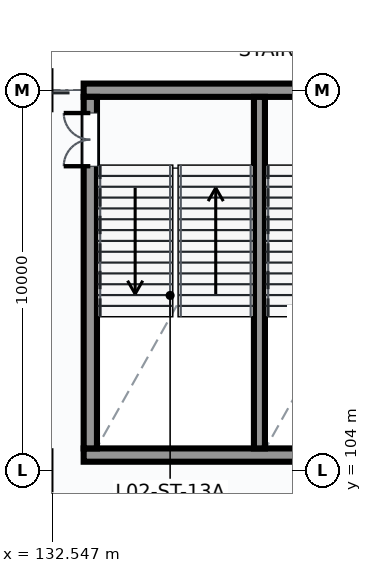
"""IFC4 building model, lengths in metres.
Left out: names, types, materials, properties, quantities, classifications, styles, units other than length and angle.
Written with IfcOpenShell. Run it as: python <this file> out.ifc"""

import sys

from ifc_helpers import new_model, si_unit, direction, frame, frame_2d, origin, place, context, subcontext, project, spatial, rectangle, extrude, element, fill, save


model = new_model("IFC4")
c1 = context("Model", 3, precision=1e-05, world=origin(), true_north=direction((0.0, 1.0)))
c2 = subcontext(c1, "Body", "Model", "MODEL_VIEW")
j1 = project(units=[si_unit("LENGTHUNIT", "METRE"), si_unit("PLANEANGLEUNIT", "RADIAN")], contexts=[c1])
p1 = place(None, origin())
s1 = spatial("IfcSite", under=j1, at=p1, CompositionType="ELEMENT")
p2 = place(p1, origin())
s2 = spatial("IfcBuilding", under=s1, at=p2, CompositionType="ELEMENT")
p3 = place(p2, frame((0.0, 0.0, 10.2)))
s3 = spatial("IfcBuildingStorey", under=s2, at=p3, CompositionType="ELEMENT", Elevation=10.2)
p4 = place(p3, frame((133.375, 104.4, 0.0), z_axis=(0.0, 0.0, 1.0), x_axis=(1.0, 0.0, 0.0)))
e1 = element("IfcWall", 1, at=p4, inside=s3, PredefinedType="SHEAR", context=c2, shape_type="SweptSolid", body=[
    extrude(rectangle(XDim=9.25, YDim=0.35, at=frame_2d((4.625, 0.0))), origin(), (0.0, 0.0, 1.0), 4.5),
])
p5 = place(p3, frame((133.375, 114.0, 0.0), z_axis=(0.0, 0.0, 1.0), x_axis=(1.0, 0.0, 0.0)))
e2 = element("IfcWall", 2, at=p5, inside=s3, PredefinedType="SHEAR", context=c2, shape_type="SweptSolid", body=[
    extrude(rectangle(XDim=9.25, YDim=0.35, at=frame_2d((4.625, 0.0))), origin(), (0.0, 0.0, 1.0), 3.586),
])
p6 = place(p3, frame((133.55, 104.575, 0.0), z_axis=(0.0, 0.0, 1.0), x_axis=(0.0, 1.0, 0.0)))
e3 = element("IfcWall", 3, at=p6, inside=s3, PredefinedType="SHEAR", context=c2, shape_type="SweptSolid", body=[
    extrude(rectangle(XDim=9.25, YDim=0.35, at=frame_2d((4.625, 0.0))), origin(), (0.0, 0.0, 1.0), 4.5),
])
p7 = place(p6, frame((7.425, 0.0, 0.0)))
e4 = element("IfcOpeningElement", 4, at=p7, cuts=e3, PredefinedType="OPENING", context=c2, shape_type="SweptSolid", body=[
    extrude(rectangle(XDim=1.4, YDim=2.2, at=frame_2d((0.7, 1.1))), frame((0.0, 0.185, 0.0), z_axis=(0.0, -1.0, 0.0), x_axis=(1.0, 0.0, 0.0)), (0.0, 0.0, 1.0), 0.37),
])
p8 = place(p3, frame((138.0, 104.575, 0.0), z_axis=(0.0, 0.0, 1.0), x_axis=(0.0, 1.0, 0.0)))
e5 = element("IfcWall", 5, at=p8, inside=s3, PredefinedType="SHEAR", context=c2, shape_type="SweptSolid", body=[
    extrude(rectangle(XDim=9.25, YDim=0.29, at=frame_2d((4.625, 0.0))), origin(), (0.0, 0.0, 1.0), 4.5),
])
p9 = place(p7, frame((1.4, 0.0, 0.0), z_axis=(0.0, 0.0, 1.0), x_axis=(-1.0, 0.0, 0.0)))
e6 = element("IfcDoor", 6, at=p9, inside=s3, OperationType="DOUBLE_DOOR_SINGLE_SWING", PredefinedType="DOOR", context=c2, shape_type="SweptSolid", body=[
    extrude(rectangle(XDim=1.4, YDim=2.2, at=frame_2d((0.7, 1.1))), frame((0.0, 0.025, 0.0), z_axis=(0.0, -1.0, 0.0), x_axis=(1.0, 0.0, 0.0)), (0.0, 0.0, 1.0), 0.05),
])
fill(e4, e6)
save(model, sys.argv[1])
